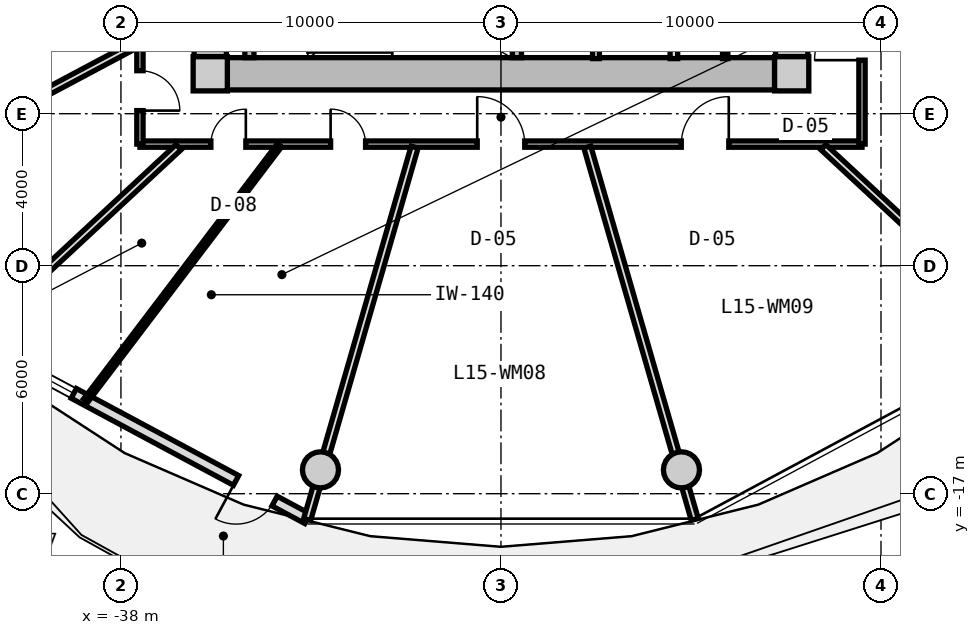
"""IFC4 building model, lengths in metres.
Left out: names, types, materials, properties, quantities, classifications, styles, units other than length and angle.
Written with IfcOpenShell. Run it as: python <this file> out.ifc"""

import sys

from ifc_helpers import new_model, si_unit, direction, frame, frame_2d, origin, origin_2d, place, context, subcontext, project, spatial, rectangle, circle, extrude, source, transform, mapped, element, fill, save


model = new_model("IFC4")
c1 = context("Model", 3, precision=1e-05, world=origin(), true_north=direction((0.0, 1.0)))
c2 = subcontext(c1, "Body", "Model", "MODEL_VIEW")
j1 = project(units=[si_unit("LENGTHUNIT", "METRE"), si_unit("PLANEANGLEUNIT", "RADIAN")], contexts=[c1])
p1 = place(None, origin())
s1 = spatial("IfcSite", under=j1, at=p1, CompositionType="ELEMENT")
p2 = place(p1, origin())
s2 = spatial("IfcBuilding", under=s1, at=p2, CompositionType="ELEMENT")
p3 = place(p2, frame((0.0, 0.0, 52.1)))
s3 = spatial("IfcBuildingStorey", under=s2, at=p3, CompositionType="ELEMENT", Elevation=52.1)
m1 = source(origin(), c2, "Body", "SweptSolid", [
    extrude(rectangle(XDim=0.9, YDim=0.9, at=origin_2d()), origin(), (0.0, 0.0, 1.0), 3.05),
])
for number, where, z_axis, x_axis in (
    (1, (-35.65, -5.95, 0.0), (0.0, 0.0, 1.0), (1.0, 0.0, 0.0)),
    (2, (-20.35, -5.95, 0.0), (0.0, 0.0, 1.0), (1.0, 0.0, 0.0)),
):
    element("IfcColumn", number, at=place(p3, frame(where, z_axis=z_axis, x_axis=x_axis)), inside=s3, PredefinedType="COLUMN", context=c2, shape_type="MappedRepresentation", body=[
        mapped(m1, transform((0.0, 0.0, 0.0), x_axis=(1.0, 0.0, 0.0), y_axis=(0.0, 1.0, 0.0), z_axis=(0.0, 0.0, 1.0), scale=1.0)),
    ])
m2 = source(origin(), c2, "Body", "SweptSolid", [
    extrude(rectangle(XDim=14.4, YDim=0.85, at=frame_2d((7.2, 0.0))), origin(), (0.0, 0.0, 1.0), 2.79),
])
p4 = place(p3, frame((-20.8, -5.95, 0.0), z_axis=(0.0, 0.0, 1.0), x_axis=(-1.0, 0.0, 0.0)))
e3 = element("IfcWall", 3, at=p4, inside=s3, PredefinedType="SHEAR", context=c2, shape_type="MappedRepresentation", body=[
    mapped(m2, transform((0.0, 0.0, 0.0), x_axis=(1.0, 0.0, 0.0), y_axis=(0.0, 1.0, 0.0), z_axis=(0.0, 0.0, 1.0), scale=1.0)),
])
m3 = source(origin(), c2, "Body", "SweptSolid", [
    extrude(rectangle(XDim=11.0, YDim=0.85, at=frame_2d((5.5, 0.0))), origin(), (0.0, 0.0, 1.0), 2.79),
])
p5 = place(p3, frame((-35.65, -5.5, 0.0), z_axis=(0.0, 0.0, 1.0), x_axis=(0.0, 1.0, 0.0)))
e4 = element("IfcWall", 4, at=p5, inside=s3, PredefinedType="SHEAR", context=c2, shape_type="MappedRepresentation", body=[
    mapped(m3, transform((0.0, 0.0, 0.0), x_axis=(1.0, 0.0, 0.0), y_axis=(0.0, 1.0, 0.0), z_axis=(0.0, 0.0, 1.0), scale=1.0)),
])
p6 = place(p5, frame((3.8, 0.0, 0.0)))
e5 = element("IfcOpeningElement", 5, at=p6, cuts=e4, PredefinedType="OPENING", context=c2, shape_type="SweptSolid", body=[
    extrude(rectangle(XDim=1.2, YDim=2.15, at=frame_2d((0.6, 1.075))), frame((0.0, 0.435, 0.0), z_axis=(0.0, -1.0, 0.0), x_axis=(1.0, 0.0, 0.0)), (0.0, 0.0, 1.0), 0.87),
])
p7 = place(p3, frame((-20.35, 5.5, 0.0), z_axis=(0.0, 0.0, 1.0), x_axis=(0.0, -1.0, 0.0)))
e6 = element("IfcWall", 6, at=p7, inside=s3, PredefinedType="SHEAR", context=c2, shape_type="MappedRepresentation", body=[
    mapped(m3, transform((0.0, 0.0, 0.0), x_axis=(1.0, 0.0, 0.0), y_axis=(0.0, 1.0, 0.0), z_axis=(0.0, 0.0, 1.0), scale=1.0)),
])
p8 = place(p7, frame((5.65, 0.0, 0.0)))
e7 = element("IfcOpeningElement", 7, at=p8, cuts=e6, PredefinedType="OPENING", context=c2, shape_type="SweptSolid", body=[
    extrude(rectangle(XDim=1.2, YDim=2.15, at=frame_2d((0.6, 1.075))), frame((0.0, 0.435, 0.0), z_axis=(0.0, -1.0, 0.0), x_axis=(1.0, 0.0, 0.0)), (0.0, 0.0, 1.0), 0.87),
])
m4 = source(origin(), c2, "Body", "SweptSolid", [
    extrude(circle(Radius=0.475, at=origin_2d()), origin(), (0.0, 0.0, 1.0), 3.05),
])
for number, where, z_axis, x_axis in (
    (8, (-32.749, -16.373, 0.0), (0.0, 0.0, 1.0), (1.0, 0.0, 0.0)),
    (9, (-23.251, -16.373, 0.0), (0.0, 0.0, 1.0), (1.0, 0.0, 0.0)),
):
    element("IfcColumn", number, at=place(p3, frame(where, z_axis=z_axis, x_axis=x_axis)), inside=s3, PredefinedType="COLUMN", context=c2, shape_type="MappedRepresentation", body=[
        mapped(m4, transform((0.0, 0.0, 0.0), x_axis=(1.0, 0.0, 0.0), y_axis=(0.0, 1.0, 0.0), z_axis=(0.0, 0.0, 1.0), scale=1.0)),
    ])
m5 = source(origin(), c2, "Body", "SweptSolid", [
    extrude(rectangle(XDim=10.011, YDim=0.29, at=frame_2d((5.005, 0.0))), origin(), (0.0, 0.0, 1.0), 2.79),
])
p9 = place(p3, frame((-33.094, -17.657, 0.0), z_axis=(0.0, 0.0, 1.0), x_axis=(-0.881272505317, 0.472608475773, 0.0)))
e10 = element("IfcWall", 10, at=p9, inside=s3, PredefinedType="SOLIDWALL", context=c2, shape_type="MappedRepresentation", body=[
    mapped(m5, transform((0.0, 0.0, 0.0), x_axis=(1.0, 0.0, 0.0), y_axis=(0.0, 1.0, 0.0), z_axis=(0.0, 0.0, 1.0), scale=1.0)),
])
p10 = place(p9, frame((0.98, 0.0, 0.0)))
e11 = element("IfcOpeningElement", 11, at=p10, cuts=e10, PredefinedType="OPENING", context=c2, shape_type="SweptSolid", body=[
    extrude(rectangle(XDim=1.15, YDim=2.25, at=frame_2d((0.575, 1.125))), frame((0.0, 0.155, 0.0), z_axis=(0.0, -1.0, 0.0), x_axis=(1.0, 0.0, 0.0)), (0.0, 0.0, 1.0), 0.31),
])
p11 = place(p9, frame((6.975, 0.0, 0.85)))
e12 = element("IfcOpeningElement", 12, at=p11, cuts=e10, PredefinedType="OPENING", context=c2, shape_type="SweptSolid", body=[
    extrude(rectangle(XDim=1.2, YDim=1.5, at=frame_2d((0.6, 0.75))), frame((0.0, 0.155, 0.0), z_axis=(0.0, -1.0, 0.0), x_axis=(1.0, 0.0, 0.0)), (0.0, 0.0, 1.0), 0.31),
])
m6 = source(origin(), c2, "Body", "SweptSolid", [
    extrude(rectangle(XDim=3.075, YDim=0.24, at=frame_2d((1.538, 0.0))), origin(), (0.0, 0.0, 1.0), 2.79),
])
for number, where, z_axis, x_axis in (
    (13, (-34.62, -5.525, 0.0), (0.0, 0.0, 1.0), (0.0, 1.0, 0.0)),
    (14, (-27.58, -5.525, 0.0), (0.0, 0.0, 1.0), (0.0, 1.0, 0.0)),
):
    element("IfcWall", number, at=place(p3, frame(where, z_axis=z_axis, x_axis=x_axis)), inside=s3, PredefinedType="PARTITIONING", context=c2, shape_type="MappedRepresentation", body=[
        mapped(m6, transform((0.0, 0.0, 0.0), x_axis=(1.0, 0.0, 0.0), y_axis=(0.0, 1.0, 0.0), z_axis=(0.0, 0.0, 1.0), scale=1.0)),
    ])
m7 = source(origin(), c2, "Body", "SweptSolid", [
    extrude(rectangle(XDim=3.8, YDim=0.2, at=frame_2d((1.9, 0.0))), origin(), (0.0, 0.0, 1.0), 2.775),
])
p12 = place(p3, frame((-23.45, -5.55, 0.0), z_axis=(0.0, 0.0, 1.0), x_axis=(0.0, 1.0, 0.0)))
e15 = element("IfcWall", 15, at=p12, inside=s3, PredefinedType="PARTITIONING", context=c2, shape_type="MappedRepresentation", body=[
    mapped(m7, transform((0.0, 0.0, 0.0), x_axis=(1.0, 0.0, 0.0), y_axis=(0.0, 1.0, 0.0), z_axis=(0.0, 0.0, 1.0), scale=1.0)),
])
m8 = source(origin(), c2, "Body", "SweptSolid", [
    extrude(rectangle(XDim=3.22, YDim=0.18, at=frame_2d((1.61, 0.0))), origin(), (0.0, 0.0, 1.0), 2.775),
])
p13 = place(p3, frame((-25.5, -5.55, 0.0), z_axis=(0.0, 0.0, 1.0), x_axis=(0.0, 1.0, 0.0)))
e16 = element("IfcWall", 16, at=p13, inside=s3, PredefinedType="PARTITIONING", context=c2, shape_type="MappedRepresentation", body=[
    mapped(m8, transform((0.0, 0.0, 0.0), x_axis=(1.0, 0.0, 0.0), y_axis=(0.0, 1.0, 0.0), z_axis=(0.0, 0.0, 1.0), scale=1.0)),
])
m9 = source(origin(), c2, "Body", "SweptSolid", [
    extrude(rectangle(XDim=3.8, YDim=0.14, at=frame_2d((1.9, 0.0))), origin(), (0.0, 0.0, 1.0), 2.775),
])
p14 = place(p3, frame((-22.1, -5.55, 0.0), z_axis=(0.0, 0.0, 1.0), x_axis=(0.0, 1.0, 0.0)))
e17 = element("IfcWall", 17, at=p14, inside=s3, PredefinedType="PARTITIONING", context=c2, shape_type="MappedRepresentation", body=[
    mapped(m9, transform((0.0, 0.0, 0.0), x_axis=(1.0, 0.0, 0.0), y_axis=(0.0, 1.0, 0.0), z_axis=(0.0, 0.0, 1.0), scale=1.0)),
])
m10 = source(origin(), c2, "Body", "SweptSolid", [
    extrude(rectangle(XDim=19.0, YDim=0.165, at=frame_2d((9.5, 0.0))), origin(), (0.0, 0.0, 1.0), 2.775),
])
p15 = place(p3, frame((-18.5, -7.8, 0.0), z_axis=(0.0, 0.0, 1.0), x_axis=(-1.0, 0.0, 0.0)))
e18 = element("IfcWall", 18, at=p15, inside=s3, PredefinedType="PARTITIONING", context=c2, shape_type="MappedRepresentation", body=[
    mapped(m10, transform((0.0, 0.0, 0.0), x_axis=(1.0, 0.0, 0.0), y_axis=(0.0, 1.0, 0.0), z_axis=(0.0, 0.0, 1.0), scale=1.0)),
])
p16 = place(p15, frame((16.214, 0.0, 0.0)))
e19 = element("IfcOpeningElement", 19, at=p16, cuts=e18, PredefinedType="OPENING", context=c2, shape_type="SweptSolid", body=[
    extrude(rectangle(XDim=0.92, YDim=2.1, at=frame_2d((0.46, 1.05))), frame((0.0, 0.093, 0.0), z_axis=(0.0, -1.0, 0.0), x_axis=(1.0, 0.0, 0.0)), (0.0, 0.0, 1.0), 0.185),
])
p17 = place(p15, frame((13.063, 0.0, 0.0)))
e20 = element("IfcOpeningElement", 20, at=p17, cuts=e18, PredefinedType="OPENING", context=c2, shape_type="SweptSolid", body=[
    extrude(rectangle(XDim=0.92, YDim=2.1, at=frame_2d((0.46, 1.05))), frame((0.0, 0.093, 0.0), z_axis=(0.0, -1.0, 0.0), x_axis=(1.0, 0.0, 0.0)), (0.0, 0.0, 1.0), 0.185),
])
p18 = place(p15, frame((8.875, 0.0, 0.0)))
e21 = element("IfcOpeningElement", 21, at=p18, cuts=e18, PredefinedType="OPENING", context=c2, shape_type="SweptSolid", body=[
    extrude(rectangle(XDim=1.25, YDim=2.2, at=frame_2d((0.625, 1.1))), frame((0.0, 0.093, 0.0), z_axis=(0.0, -1.0, 0.0), x_axis=(1.0, 0.0, 0.0)), (0.0, 0.0, 1.0), 0.185),
])
p19 = place(p15, frame((3.506, 0.0, 0.0)))
e22 = element("IfcOpeningElement", 22, at=p19, cuts=e18, PredefinedType="OPENING", context=c2, shape_type="SweptSolid", body=[
    extrude(rectangle(XDim=1.25, YDim=2.2, at=frame_2d((0.625, 1.1))), frame((0.0, 0.093, 0.0), z_axis=(0.0, -1.0, 0.0), x_axis=(1.0, 0.0, 0.0)), (0.0, 0.0, 1.0), 0.185),
])
m11 = source(origin(), c2, "Body", "SweptSolid", [
    extrude(rectangle(XDim=15.6, YDim=0.165, at=frame_2d((7.8, 0.0))), origin(), (0.0, 0.0, 1.0), 2.775),
])
p20 = place(p3, frame((-37.5, -7.8, 0.0), z_axis=(0.0, 0.0, 1.0), x_axis=(0.0, 1.0, 0.0)))
e23 = element("IfcWall", 23, at=p20, inside=s3, PredefinedType="PARTITIONING", context=c2, shape_type="MappedRepresentation", body=[
    mapped(m11, transform((0.0, 0.0, 0.0), x_axis=(1.0, 0.0, 0.0), y_axis=(0.0, 1.0, 0.0), z_axis=(0.0, 0.0, 1.0), scale=1.0)),
])
p21 = place(p20, frame((13.623, 0.0, 0.0)))
e24 = element("IfcOpeningElement", 24, at=p21, cuts=e23, PredefinedType="OPENING", context=c2, shape_type="SweptSolid", body=[
    extrude(rectangle(XDim=1.05, YDim=2.15, at=frame_2d((0.525, 1.075))), frame((0.0, 0.093, 0.0), z_axis=(0.0, -1.0, 0.0), x_axis=(1.0, 0.0, 0.0)), (0.0, 0.0, 1.0), 0.185),
])
p22 = place(p20, frame((11.018, 0.0, 0.0)))
e25 = element("IfcOpeningElement", 25, at=p22, cuts=e23, PredefinedType="OPENING", context=c2, shape_type="SweptSolid", body=[
    extrude(rectangle(XDim=1.05, YDim=2.15, at=frame_2d((0.525, 1.075))), frame((0.0, 0.093, 0.0), z_axis=(0.0, -1.0, 0.0), x_axis=(1.0, 0.0, 0.0)), (0.0, 0.0, 1.0), 0.185),
])
p23 = place(p20, frame((8.467, 0.0, 0.0)))
e26 = element("IfcOpeningElement", 26, at=p23, cuts=e23, PredefinedType="OPENING", context=c2, shape_type="SweptSolid", body=[
    extrude(rectangle(XDim=1.05, YDim=2.15, at=frame_2d((0.525, 1.075))), frame((0.0, 0.093, 0.0), z_axis=(0.0, -1.0, 0.0), x_axis=(1.0, 0.0, 0.0)), (0.0, 0.0, 1.0), 0.185),
])
p24 = place(p20, frame((6.035, 0.0, 0.0)))
e27 = element("IfcOpeningElement", 27, at=p24, cuts=e23, PredefinedType="OPENING", context=c2, shape_type="SweptSolid", body=[
    extrude(rectangle(XDim=1.05, YDim=2.15, at=frame_2d((0.525, 1.075))), frame((0.0, 0.093, 0.0), z_axis=(0.0, -1.0, 0.0), x_axis=(1.0, 0.0, 0.0)), (0.0, 0.0, 1.0), 0.185),
])
p25 = place(p20, frame((3.489, 0.0, 0.0)))
e28 = element("IfcOpeningElement", 28, at=p25, cuts=e23, PredefinedType="OPENING", context=c2, shape_type="SweptSolid", body=[
    extrude(rectangle(XDim=1.05, YDim=2.15, at=frame_2d((0.525, 1.075))), frame((0.0, 0.093, 0.0), z_axis=(0.0, -1.0, 0.0), x_axis=(1.0, 0.0, 0.0)), (0.0, 0.0, 1.0), 0.185),
])
p26 = place(p20, frame((0.882, 0.0, 0.0)))
e29 = element("IfcOpeningElement", 29, at=p26, cuts=e23, PredefinedType="OPENING", context=c2, shape_type="SweptSolid", body=[
    extrude(rectangle(XDim=1.05, YDim=2.15, at=frame_2d((0.525, 1.075))), frame((0.0, 0.093, 0.0), z_axis=(0.0, -1.0, 0.0), x_axis=(1.0, 0.0, 0.0)), (0.0, 0.0, 1.0), 0.185),
])
p27 = place(p3, frame((-18.5, 7.8, 0.0), z_axis=(0.0, 0.0, 1.0), x_axis=(0.0, -1.0, 0.0)))
e30 = element("IfcWall", 30, at=p27, inside=s3, PredefinedType="PARTITIONING", context=c2, shape_type="MappedRepresentation", body=[
    mapped(m11, transform((0.0, 0.0, 0.0), x_axis=(1.0, 0.0, 0.0), y_axis=(0.0, 1.0, 0.0), z_axis=(0.0, 0.0, 1.0), scale=1.0)),
])
p28 = place(p27, frame((12.141, 0.0, 0.0)))
e31 = element("IfcOpeningElement", 31, at=p28, cuts=e30, PredefinedType="OPENING", context=c2, shape_type="SweptSolid", body=[
    extrude(rectangle(XDim=1.25, YDim=2.2, at=frame_2d((0.625, 1.1))), frame((0.0, 0.093, 0.0), z_axis=(0.0, -1.0, 0.0), x_axis=(1.0, 0.0, 0.0)), (0.0, 0.0, 1.0), 0.185),
])
p29 = place(p27, frame((7.175, 0.0, 0.0)))
e32 = element("IfcOpeningElement", 32, at=p29, cuts=e30, PredefinedType="OPENING", context=c2, shape_type="SweptSolid", body=[
    extrude(rectangle(XDim=1.25, YDim=2.2, at=frame_2d((0.625, 1.1))), frame((0.0, 0.093, 0.0), z_axis=(0.0, -1.0, 0.0), x_axis=(1.0, 0.0, 0.0)), (0.0, 0.0, 1.0), 0.185),
])
p30 = place(p27, frame((2.826, 0.0, 0.0)))
e33 = element("IfcOpeningElement", 33, at=p30, cuts=e30, PredefinedType="OPENING", context=c2, shape_type="SweptSolid", body=[
    extrude(rectangle(XDim=1.05, YDim=2.15, at=frame_2d((0.525, 1.075))), frame((0.0, 0.093, 0.0), z_axis=(0.0, -1.0, 0.0), x_axis=(1.0, 0.0, 0.0)), (0.0, 0.0, 1.0), 0.185),
])
p31 = place(p27, frame((0.881, 0.0, 0.0)))
e34 = element("IfcOpeningElement", 34, at=p31, cuts=e30, PredefinedType="OPENING", context=c2, shape_type="SweptSolid", body=[
    extrude(rectangle(XDim=1.05, YDim=2.15, at=frame_2d((0.525, 1.075))), frame((0.0, 0.093, 0.0), z_axis=(0.0, -1.0, 0.0), x_axis=(1.0, 0.0, 0.0)), (0.0, 0.0, 1.0), 0.185),
])
m12 = source(origin(), c2, "Body", "SweptSolid", [
    extrude(rectangle(XDim=7.435, YDim=0.19, at=frame_2d((3.717, 0.0))), origin(), (0.0, 0.0, 1.0), 2.225),
])
p32 = place(p3, frame((-36.483, -7.88, 0.0), z_axis=(0.0, 0.0, 1.0), x_axis=(-0.732651956848, -0.680603489652, 0.0)))
e35 = element("IfcWall", 35, at=p32, inside=s3, PredefinedType="PARTITIONING", context=c2, shape_type="MappedRepresentation", body=[
    mapped(m12, transform((0.0, 0.0, 0.0), x_axis=(1.0, 0.0, 0.0), y_axis=(0.0, 1.0, 0.0), z_axis=(0.0, 0.0, 1.0), scale=1.0)),
])
m13 = source(origin(), c2, "Body", "SweptSolid", [
    extrude(rectangle(XDim=7.873, YDim=0.19, at=frame_2d((3.937, 0.0))), origin(), (0.0, 0.0, 1.0), 2.775),
])
p33 = place(p3, frame((-37.53, -5.138, 0.0), z_axis=(0.0, 0.0, 1.0), x_axis=(-0.882666052726, -0.470000680175, 0.0)))
e36 = element("IfcWall", 36, at=p33, inside=s3, PredefinedType="PARTITIONING", context=c2, shape_type="MappedRepresentation", body=[
    mapped(m13, transform((0.0, 0.0, 0.0), x_axis=(1.0, 0.0, 0.0), y_axis=(0.0, 1.0, 0.0), z_axis=(0.0, 0.0, 1.0), scale=1.0)),
])
m14 = source(origin(), c2, "Body", "SweptSolid", [
    extrude(rectangle(XDim=10.196, YDim=0.19, at=frame_2d((5.098, 0.0))), origin(), (0.0, 0.0, 1.0), 2.225),
])
p34 = place(p3, frame((-30.273, -7.88, 0.0), z_axis=(0.0, 0.0, 1.0), x_axis=(-0.277136420347, -0.960830580549, 0.0)))
e37 = element("IfcWall", 37, at=p34, inside=s3, PredefinedType="PARTITIONING", context=c2, shape_type="MappedRepresentation", body=[
    mapped(m14, transform((0.0, 0.0, 0.0), x_axis=(1.0, 0.0, 0.0), y_axis=(0.0, 1.0, 0.0), z_axis=(0.0, 0.0, 1.0), scale=1.0)),
])
m15 = source(origin(), c2, "Body", "SweptSolid", [
    extrude(rectangle(XDim=8.436, YDim=0.14, at=frame_2d((4.218, 0.0))), origin(), (0.0, 0.0, 1.0), 2.775),
])
p35 = place(p3, frame((-33.828, -7.83, 0.0), z_axis=(0.0, 0.0, 1.0), x_axis=(-0.604486552388, -0.796615345058, 0.0)))
e38 = element("IfcWall", 38, at=p35, inside=s3, PredefinedType="PARTITIONING", context=c2, shape_type="MappedRepresentation", body=[
    mapped(m15, transform((0.0, 0.0, 0.0), x_axis=(1.0, 0.0, 0.0), y_axis=(0.0, 1.0, 0.0), z_axis=(0.0, 0.0, 1.0), scale=1.0)),
])
p36 = place(p3, frame((-25.727, -7.88, 0.0), z_axis=(0.0, 0.0, 1.0), x_axis=(0.277136420347, -0.960830580549, 0.0)))
e39 = element("IfcWall", 39, at=p36, inside=s3, PredefinedType="PARTITIONING", context=c2, shape_type="MappedRepresentation", body=[
    mapped(m14, transform((0.0, 0.0, 0.0), x_axis=(1.0, 0.0, 0.0), y_axis=(0.0, 1.0, 0.0), z_axis=(0.0, 0.0, 1.0), scale=1.0)),
])
p37 = place(p3, frame((-19.517, -7.88, 0.0), z_axis=(0.0, 0.0, 1.0), x_axis=(0.732651956848, -0.680603489652, 0.0)))
e40 = element("IfcWall", 40, at=p37, inside=s3, PredefinedType="PARTITIONING", context=c2, shape_type="MappedRepresentation", body=[
    mapped(m12, transform((0.0, 0.0, 0.0), x_axis=(1.0, 0.0, 0.0), y_axis=(0.0, 1.0, 0.0), z_axis=(0.0, 0.0, 1.0), scale=1.0)),
])
m16 = source(origin(), c2, "Body", "SweptSolid", [
    extrude(rectangle(XDim=1.15, YDim=2.25, at=frame_2d((0.575, 1.125))), frame((0.0, 0.025, 0.0), z_axis=(0.0, -1.0, 0.0), x_axis=(1.0, 0.0, 0.0)), (0.0, 0.0, 1.0), 0.05),
])
p38 = place(p10, origin())
e41 = element("IfcDoor", 41, at=p38, inside=s3, OperationType="SINGLE_SWING_RIGHT", PredefinedType="DOOR", context=c2, shape_type="MappedRepresentation", body=[
    mapped(m16, transform((0.0, 0.0, 0.0), x_axis=(1.0, 0.0, 0.0), y_axis=(0.0, 1.0, 0.0), z_axis=(0.0, 0.0, 1.0), scale=1.0)),
])
fill(e11, e41)
m17 = source(origin(), c2, "Body", "SweptSolid", [
    extrude(rectangle(XDim=1.2, YDim=1.5, at=frame_2d((0.6, 0.75))), frame((0.0, 0.03, 0.0), z_axis=(0.0, -1.0, 0.0), x_axis=(1.0, 0.0, 0.0)), (0.0, 0.0, 1.0), 0.06),
])
p39 = place(p11, origin())
e42 = element("IfcWindow", 42, at=p39, inside=s3, PartitioningType="SINGLE_PANEL", PredefinedType="WINDOW", context=c2, shape_type="MappedRepresentation", body=[
    mapped(m17, transform((0.0, 0.0, 0.0), x_axis=(1.0, 0.0, 0.0), y_axis=(0.0, 1.0, 0.0), z_axis=(0.0, 0.0, 1.0), scale=1.0)),
])
fill(e12, e42)
m18 = source(origin(), c2, "Body", "SweptSolid", [
    extrude(rectangle(XDim=1.05, YDim=2.15, at=frame_2d((0.525, 1.075))), frame((0.0, 0.025, 0.0), z_axis=(0.0, -1.0, 0.0), x_axis=(1.0, 0.0, 0.0)), (0.0, 0.0, 1.0), 0.05),
])
p40 = place(p26, frame((1.05, 0.0, 0.0), z_axis=(0.0, 0.0, 1.0), x_axis=(-1.0, 0.0, 0.0)))
e43 = element("IfcDoor", 43, at=p40, inside=s3, OperationType="SINGLE_SWING_RIGHT", PredefinedType="DOOR", context=c2, shape_type="MappedRepresentation", body=[
    mapped(m18, transform((0.0, 0.0, 0.0), x_axis=(1.0, 0.0, 0.0), y_axis=(0.0, 1.0, 0.0), z_axis=(0.0, 0.0, 1.0), scale=1.0)),
])
fill(e29, e43)
m19 = source(origin(), c2, "Body", "SweptSolid", [
    extrude(rectangle(XDim=0.92, YDim=2.1, at=frame_2d((0.46, 1.05))), frame((0.0, 0.025, 0.0), z_axis=(0.0, -1.0, 0.0), x_axis=(1.0, 0.0, 0.0)), (0.0, 0.0, 1.0), 0.05),
])
p41 = place(p16, frame((0.92, 0.0, 0.0), z_axis=(0.0, 0.0, 1.0), x_axis=(-1.0, 0.0, 0.0)))
e44 = element("IfcDoor", 44, at=p41, inside=s3, OperationType="SINGLE_SWING_RIGHT", PredefinedType="DOOR", context=c2, shape_type="MappedRepresentation", body=[
    mapped(m19, transform((0.0, 0.0, 0.0), x_axis=(1.0, 0.0, 0.0), y_axis=(0.0, 1.0, 0.0), z_axis=(0.0, 0.0, 1.0), scale=1.0)),
])
fill(e19, e44)
p42 = place(p17, frame((0.92, 0.0, 0.0), z_axis=(0.0, 0.0, 1.0), x_axis=(-1.0, 0.0, 0.0)))
e45 = element("IfcDoor", 45, at=p42, inside=s3, OperationType="SINGLE_SWING_LEFT", PredefinedType="DOOR", context=c2, shape_type="MappedRepresentation", body=[
    mapped(m19, transform((0.0, 0.0, 0.0), x_axis=(1.0, 0.0, 0.0), y_axis=(0.0, 1.0, 0.0), z_axis=(0.0, 0.0, 1.0), scale=1.0)),
])
fill(e20, e45)
m20 = source(origin(), c2, "Body", "SweptSolid", [
    extrude(rectangle(XDim=1.25, YDim=2.2, at=frame_2d((0.625, 1.1))), frame((0.0, 0.025, 0.0), z_axis=(0.0, -1.0, 0.0), x_axis=(1.0, 0.0, 0.0)), (0.0, 0.0, 1.0), 0.05),
])
p43 = place(p18, frame((1.25, 0.0, 0.0), z_axis=(0.0, 0.0, 1.0), x_axis=(-1.0, 0.0, 0.0)))
e46 = element("IfcDoor", 46, at=p43, inside=s3, OperationType="SINGLE_SWING_LEFT", PredefinedType="DOOR", context=c2, shape_type="MappedRepresentation", body=[
    mapped(m20, transform((0.0, 0.0, 0.0), x_axis=(1.0, 0.0, 0.0), y_axis=(0.0, 1.0, 0.0), z_axis=(0.0, 0.0, 1.0), scale=1.0)),
])
fill(e21, e46)
p44 = place(p19, frame((1.25, 0.0, 0.0), z_axis=(0.0, 0.0, 1.0), x_axis=(-1.0, 0.0, 0.0)))
e47 = element("IfcDoor", 47, at=p44, inside=s3, OperationType="SINGLE_SWING_RIGHT", PredefinedType="DOOR", context=c2, shape_type="MappedRepresentation", body=[
    mapped(m20, transform((0.0, 0.0, 0.0), x_axis=(1.0, 0.0, 0.0), y_axis=(0.0, 1.0, 0.0), z_axis=(0.0, 0.0, 1.0), scale=1.0)),
])
fill(e22, e47)
p45 = place(p28, frame((1.25, 0.0, 0.0), z_axis=(0.0, 0.0, 1.0), x_axis=(-1.0, 0.0, 0.0)))
e48 = element("IfcDoor", 48, at=p45, inside=s3, OperationType="SINGLE_SWING_LEFT", PredefinedType="DOOR", context=c2, shape_type="MappedRepresentation", body=[
    mapped(m20, transform((0.0, 0.0, 0.0), x_axis=(1.0, 0.0, 0.0), y_axis=(0.0, 1.0, 0.0), z_axis=(0.0, 0.0, 1.0), scale=1.0)),
])
fill(e31, e48)
save(model, sys.argv[1])
